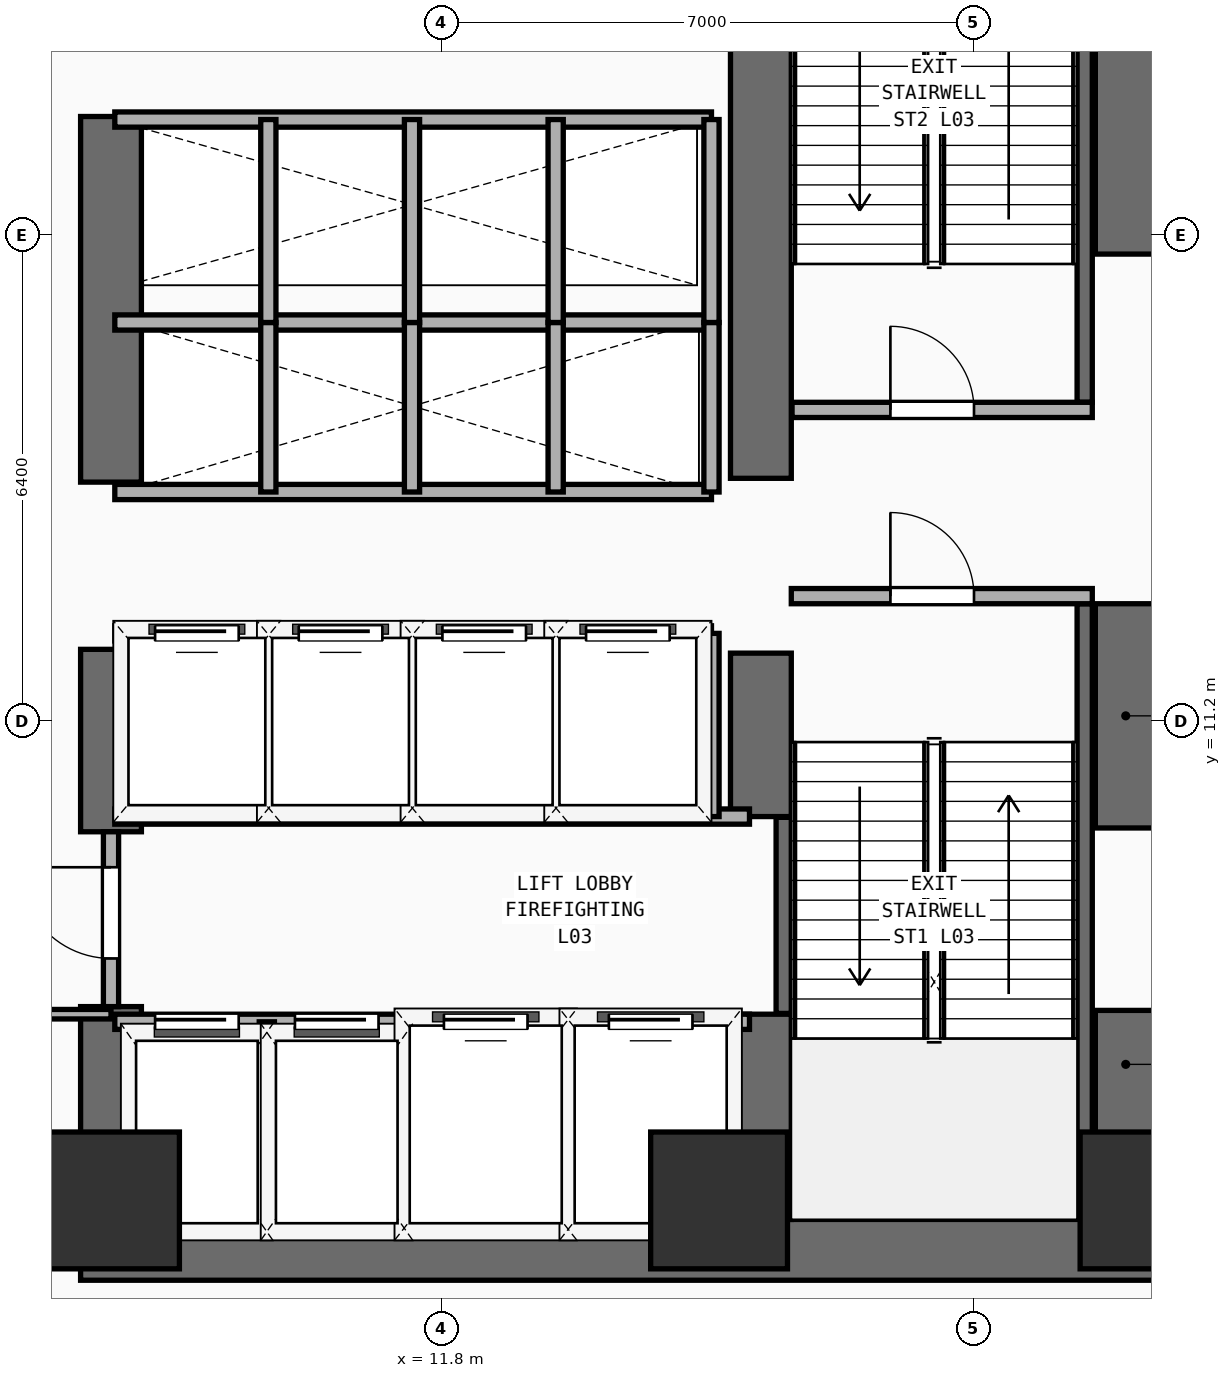
"""IFC4 building model, lengths in metres.
Left out: names, types, materials, properties, quantities, classifications, styles, units other than length and angle.
Written with IfcOpenShell. Run it as: python <this file> out.ifc"""

import sys

from ifc_helpers import new_model, si_unit, direction, frame, frame_2d, origin, origin_2d, place, context, subcontext, project, spatial, rectangle, extrude, element, fill, save


model = new_model("IFC4")
c1 = context("Model", 3, precision=1e-05, world=origin(), true_north=direction((0.0, 1.0)))
c2 = subcontext(c1, "Body", "Model", "MODEL_VIEW")
j1 = project(units=[si_unit("LENGTHUNIT", "METRE"), si_unit("PLANEANGLEUNIT", "RADIAN")], contexts=[c1])
p1 = place(None, origin())
s1 = spatial("IfcSite", under=j1, at=p1, CompositionType="ELEMENT")
p2 = place(p1, origin())
s2 = spatial("IfcBuilding", under=s1, at=p2, CompositionType="ELEMENT")
p3 = place(p2, frame((0.0, 0.0, 10.4)))
s3 = spatial("IfcBuildingStorey", under=s2, at=p3, CompositionType="ELEMENT", Elevation=10.4)
p4 = place(p3, frame((7.05, 4.25, 0.0), z_axis=(0.0, 0.0, 1.0), x_axis=(1.0, 0.0, 0.0)))
e1 = element("IfcWall", 1, at=p4, inside=s3, PredefinedType="SHEAR", context=c2, shape_type="SweptSolid", body=[
    extrude(rectangle(XDim=14.15, YDim=0.8, at=frame_2d((7.075, 0.0))), origin(), (0.0, 0.0, 1.0), 4.46),
])
p5 = place(p3, frame((7.45, 4.65, 0.0), z_axis=(0.0, 0.0, 1.0), x_axis=(0.0, 1.0, 0.0)))
e2 = element("IfcWall", 2, at=p5, inside=s3, PredefinedType="SHEAR", context=c2, shape_type="SweptSolid", body=[
    extrude(rectangle(XDim=2.8, YDim=0.8, at=frame_2d((1.4, 0.0))), origin(), (0.0, 0.0, 1.0), 4.46),
])
p6 = place(p3, frame((7.45, 9.75, 0.0), z_axis=(0.0, 0.0, 1.0), x_axis=(0.0, 1.0, 0.0)))
e3 = element("IfcWall", 3, at=p6, inside=s3, PredefinedType="SHEAR", context=c2, shape_type="SweptSolid", body=[
    extrude(rectangle(XDim=2.4, YDim=0.8, at=frame_2d((1.2, 0.0))), origin(), (0.0, 0.0, 1.0), 4.46),
])
p7 = place(p3, frame((7.45, 14.35, 0.0), z_axis=(0.0, 0.0, 1.0), x_axis=(0.0, 1.0, 0.0)))
e4 = element("IfcWall", 4, at=p7, inside=s3, PredefinedType="SHEAR", context=c2, shape_type="SweptSolid", body=[
    extrude(rectangle(XDim=4.81, YDim=0.8, at=frame_2d((2.405, 0.0))), origin(), (0.0, 0.0, 1.0), 4.46),
])
p8 = place(p3, frame((20.8, 4.65, 0.0), z_axis=(0.0, 0.0, 1.0), x_axis=(0.0, 1.0, 0.0)))
e5 = element("IfcWall", 5, at=p8, inside=s3, PredefinedType="SHEAR", context=c2, shape_type="SweptSolid", body=[
    extrude(rectangle(XDim=2.75, YDim=0.8, at=frame_2d((1.375, 0.0))), origin(), (0.0, 0.0, 1.0), 4.46),
])
p9 = place(p3, frame((20.8, 9.8, 0.0), z_axis=(0.0, 0.0, 1.0), x_axis=(0.0, 1.0, 0.0)))
e6 = element("IfcWall", 6, at=p9, inside=s3, PredefinedType="SHEAR", context=c2, shape_type="SweptSolid", body=[
    extrude(rectangle(XDim=2.95, YDim=0.8, at=frame_2d((1.475, 0.0))), origin(), (0.0, 0.0, 1.0), 4.46),
])
p10 = place(p3, frame((20.8, 17.35, 0.0), z_axis=(0.0, 0.0, 1.0), x_axis=(0.0, 1.0, 0.0)))
e7 = element("IfcWall", 7, at=p10, inside=s3, PredefinedType="SHEAR", context=c2, shape_type="SweptSolid", body=[
    extrude(rectangle(XDim=6.15, YDim=0.8, at=frame_2d((3.075, 0.0))), origin(), (0.0, 0.0, 1.0), 4.46),
])
p11 = place(p3, frame((16.0, 4.65, 0.0), z_axis=(0.0, 0.0, 1.0), x_axis=(0.0, 1.0, 0.0)))
e8 = element("IfcWall", 8, at=p11, inside=s3, PredefinedType="SHEAR", context=c2, shape_type="SweptSolid", body=[
    extrude(rectangle(XDim=2.7, YDim=0.8, at=frame_2d((1.35, 0.0))), origin(), (0.0, 0.0, 1.0), 4.46),
])
p12 = place(p3, frame((16.0, 9.95, 0.0), z_axis=(0.0, 0.0, 1.0), x_axis=(0.0, 1.0, 0.0)))
e9 = element("IfcWall", 9, at=p12, inside=s3, PredefinedType="SHEAR", context=c2, shape_type="SweptSolid", body=[
    extrude(rectangle(XDim=2.15, YDim=0.8, at=frame_2d((1.075, 0.0))), origin(), (0.0, 0.0, 1.0), 4.46),
])
p13 = place(p3, frame((16.0, 14.4, 0.0), z_axis=(0.0, 0.0, 1.0), x_axis=(0.0, 1.0, 0.0)))
e10 = element("IfcWall", 10, at=p13, inside=s3, PredefinedType="SHEAR", context=c2, shape_type="SweptSolid", body=[
    extrude(rectangle(XDim=9.1, YDim=0.8, at=frame_2d((4.55, 0.0))), origin(), (0.0, 0.0, 1.0), 4.46),
])
for number, where, z_axis, x_axis in (
    (11, (7.45, 4.9, 0.0), (0.0, 0.0, 1.0), (1.0, 0.0, 0.0)),
    (12, (15.45, 4.9, 0.0), (0.0, 0.0, 1.0), (1.0, 0.0, 0.0)),
    (13, (21.1, 4.9, 0.0), (0.0, 0.0, 1.0), (1.0, 0.0, 0.0)),
):
    element("IfcColumn", number, at=place(p3, frame(where, z_axis=z_axis, x_axis=x_axis)), inside=s3, PredefinedType="COLUMN", context=c2, shape_type="SweptSolid", body=[
        extrude(rectangle(XDim=1.8, YDim=1.8, at=origin_2d()), origin(), (0.0, 0.0, 1.0), 4.46),
    ])
p14 = place(p3, frame((16.3, 7.36, 0.0), z_axis=(0.0, 0.0, 1.0), x_axis=(0.0, 1.0, 0.0)))
e14 = element("IfcWall", 14, at=p14, inside=s3, PredefinedType="SHEAR", context=c2, shape_type="SweptSolid", body=[
    extrude(rectangle(XDim=2.58, YDim=0.2, at=frame_2d((1.29, 0.0))), origin(), (0.0, 0.0, 1.0), 4.46),
])
p15 = place(p3, frame((20.26, 4.66, 0.0), z_axis=(0.0, 0.0, 1.0), x_axis=(0.0, 1.0, 0.0)))
e15 = element("IfcWall", 15, at=p15, inside=s3, PredefinedType="SHEAR", context=c2, shape_type="SweptSolid", body=[
    extrude(rectangle(XDim=8.09, YDim=0.2, at=frame_2d((4.045, 0.0))), origin(), (0.0, 0.0, 1.0), 4.46),
])
p16 = place(p3, frame((16.4, 12.85, 0.0), z_axis=(0.0, 0.0, 1.0), x_axis=(1.0, 0.0, 0.0)))
e16 = element("IfcWall", 16, at=p16, inside=s3, PredefinedType="PARTITIONING", context=c2, shape_type="SweptSolid", body=[
    extrude(rectangle(XDim=3.96, YDim=0.2, at=frame_2d((1.98, 0.0))), origin(), (0.0, 0.0, 1.0), 4.46),
])
p17 = place(p16, frame((1.304, 0.0, 0.0)))
e17 = element("IfcOpeningElement", 17, at=p17, cuts=e16, PredefinedType="OPENING", context=c2, shape_type="SweptSolid", body=[
    extrude(rectangle(XDim=1.1, YDim=2.2, at=frame_2d((0.55, 1.1))), frame((0.0, 0.11, 0.0), z_axis=(0.0, -1.0, 0.0), x_axis=(1.0, 0.0, 0.0)), (0.0, 0.0, 1.0), 0.22),
])
p18 = place(p3, frame((20.26, 15.4, 0.0), z_axis=(0.0, 0.0, 1.0), x_axis=(0.0, 1.0, 0.0)))
e18 = element("IfcWall", 18, at=p18, inside=s3, PredefinedType="SHEAR", context=c2, shape_type="SweptSolid", body=[
    extrude(rectangle(XDim=8.09, YDim=0.2, at=frame_2d((4.045, 0.0))), origin(), (0.0, 0.0, 1.0), 4.46),
])
p19 = place(p3, frame((16.41, 15.3, 0.0), z_axis=(0.0, 0.0, 1.0), x_axis=(1.0, 0.0, 0.0)))
e19 = element("IfcWall", 19, at=p19, inside=s3, PredefinedType="PARTITIONING", context=c2, shape_type="SweptSolid", body=[
    extrude(rectangle(XDim=3.95, YDim=0.2, at=frame_2d((1.975, 0.0))), origin(), (0.0, 0.0, 1.0), 4.46),
])
p20 = place(p19, frame((1.294, 0.0, 0.0)))
e20 = element("IfcOpeningElement", 20, at=p20, cuts=e19, PredefinedType="OPENING", context=c2, shape_type="SweptSolid", body=[
    extrude(rectangle(XDim=1.1, YDim=2.2, at=frame_2d((0.55, 1.1))), frame((0.0, 0.11, 0.0), z_axis=(0.0, -1.0, 0.0), x_axis=(1.0, 0.0, 0.0)), (0.0, 0.0, 1.0), 0.22),
])
p21 = place(p3, frame((7.5, 7.25, 0.0), z_axis=(0.0, 0.0, 1.0), x_axis=(1.0, 0.0, 0.0)))
e21 = element("IfcWall", 21, at=p21, inside=s3, PredefinedType="PARTITIONING", context=c2, shape_type="SweptSolid", body=[
    extrude(rectangle(XDim=8.35, YDim=0.2, at=frame_2d((4.175, 0.0))), origin(), (0.0, 0.0, 1.0), 4.46),
])
p22 = place(p21, frame((0.53, 0.0, 0.0)))
e22 = element("IfcOpeningElement", 22, at=p22, cuts=e21, PredefinedType="OPENING", context=c2, shape_type="SweptSolid", body=[
    extrude(rectangle(XDim=1.1, YDim=2.2, at=frame_2d((0.55, 1.1))), frame((0.0, 0.11, 0.0), z_axis=(0.0, -1.0, 0.0), x_axis=(1.0, 0.0, 0.0)), (0.0, 0.0, 1.0), 0.22),
])
p23 = place(p21, frame((2.37, 0.0, 0.0)))
e23 = element("IfcOpeningElement", 23, at=p23, cuts=e21, PredefinedType="OPENING", context=c2, shape_type="SweptSolid", body=[
    extrude(rectangle(XDim=1.1, YDim=2.2, at=frame_2d((0.55, 1.1))), frame((0.0, 0.11, 0.0), z_axis=(0.0, -1.0, 0.0), x_axis=(1.0, 0.0, 0.0)), (0.0, 0.0, 1.0), 0.22),
])
p24 = place(p21, frame((4.33, 0.0, 0.0)))
e24 = element("IfcOpeningElement", 24, at=p24, cuts=e21, PredefinedType="OPENING", context=c2, shape_type="SweptSolid", body=[
    extrude(rectangle(XDim=1.1, YDim=2.2, at=frame_2d((0.55, 1.1))), frame((0.0, 0.11, 0.0), z_axis=(0.0, -1.0, 0.0), x_axis=(1.0, 0.0, 0.0)), (0.0, 0.0, 1.0), 0.22),
])
p25 = place(p21, frame((6.5, 0.0, 0.0)))
e25 = element("IfcOpeningElement", 25, at=p25, cuts=e21, PredefinedType="OPENING", context=c2, shape_type="SweptSolid", body=[
    extrude(rectangle(XDim=1.1, YDim=2.2, at=frame_2d((0.55, 1.1))), frame((0.0, 0.11, 0.0), z_axis=(0.0, -1.0, 0.0), x_axis=(1.0, 0.0, 0.0)), (0.0, 0.0, 1.0), 0.22),
])
p26 = place(p3, frame((7.5, 9.95, 0.0), z_axis=(0.0, 0.0, 1.0), x_axis=(1.0, 0.0, 0.0)))
e26 = element("IfcWall", 26, at=p26, inside=s3, PredefinedType="PARTITIONING", context=c2, shape_type="SweptSolid", body=[
    extrude(rectangle(XDim=8.35, YDim=0.2, at=frame_2d((4.175, 0.0))), origin(), (0.0, 0.0, 1.0), 4.46),
])
for number, where, z_axis, x_axis in (
    (27, (9.5, 4.45, 0.0), (0.0, 0.0, 1.0), (0.0, 1.0, 0.0)),
    (28, (11.36, 4.45, 0.0), (0.0, 0.0, 1.0), (0.0, 1.0, 0.0)),
    (29, (13.46, 4.45, 0.0), (0.0, 0.0, 1.0), (0.0, 1.0, 0.0)),
):
    element("IfcWall", number, at=place(p3, frame(where, z_axis=z_axis, x_axis=x_axis)), inside=s3, PredefinedType="PARTITIONING", context=c2, shape_type="SweptSolid", body=[
        extrude(rectangle(XDim=2.8, YDim=0.2, at=frame_2d((1.4, 0.0))), origin(), (0.0, 0.0, 1.0), 4.46),
    ])
p27 = place(p3, frame((7.45, 7.45, 0.0), z_axis=(0.0, 0.0, 1.0), x_axis=(0.0, 1.0, 0.0)))
e30 = element("IfcWall", 30, at=p27, inside=s3, PredefinedType="PARTITIONING", context=c2, shape_type="SweptSolid", body=[
    extrude(rectangle(XDim=2.3, YDim=0.2, at=frame_2d((1.15, 0.0))), origin(), (0.0, 0.0, 1.0), 3.24),
])
p28 = place(p27, frame((0.633, 0.0, 0.0)))
e31 = element("IfcOpeningElement", 31, at=p28, cuts=e30, PredefinedType="OPENING", context=c2, shape_type="SweptSolid", body=[
    extrude(rectangle(XDim=1.2, YDim=2.25, at=frame_2d((0.6, 1.125))), frame((0.0, 0.11, 0.0), z_axis=(0.0, -1.0, 0.0), x_axis=(1.0, 0.0, 0.0)), (0.0, 0.0, 1.0), 0.22),
])
p29 = place(p3, frame((7.5, 12.36, 0.0), z_axis=(0.0, 0.0, 1.0), x_axis=(1.0, 0.0, 0.0)))
e32 = element("IfcWall", 32, at=p29, inside=s3, PredefinedType="PARTITIONING", context=c2, shape_type="SweptSolid", body=[
    extrude(rectangle(XDim=7.85, YDim=0.2, at=frame_2d((3.925, 0.0))), origin(), (0.0, 0.0, 1.0), 4.46),
])
p30 = place(p29, frame((0.53, 0.0, 0.0)))
e33 = element("IfcOpeningElement", 33, at=p30, cuts=e32, PredefinedType="OPENING", context=c2, shape_type="SweptSolid", body=[
    extrude(rectangle(XDim=1.1, YDim=2.2, at=frame_2d((0.55, 1.1))), frame((0.0, 0.11, 0.0), z_axis=(0.0, -1.0, 0.0), x_axis=(1.0, 0.0, 0.0)), (0.0, 0.0, 1.0), 0.22),
])
p31 = place(p29, frame((2.42, 0.0, 0.0)))
e34 = element("IfcOpeningElement", 34, at=p31, cuts=e32, PredefinedType="OPENING", context=c2, shape_type="SweptSolid", body=[
    extrude(rectangle(XDim=1.1, YDim=2.2, at=frame_2d((0.55, 1.1))), frame((0.0, 0.11, 0.0), z_axis=(0.0, -1.0, 0.0), x_axis=(1.0, 0.0, 0.0)), (0.0, 0.0, 1.0), 0.22),
])
p32 = place(p29, frame((4.31, 0.0, 0.0)))
e35 = element("IfcOpeningElement", 35, at=p32, cuts=e32, PredefinedType="OPENING", context=c2, shape_type="SweptSolid", body=[
    extrude(rectangle(XDim=1.1, YDim=2.2, at=frame_2d((0.55, 1.1))), frame((0.0, 0.11, 0.0), z_axis=(0.0, -1.0, 0.0), x_axis=(1.0, 0.0, 0.0)), (0.0, 0.0, 1.0), 0.22),
])
p33 = place(p29, frame((6.2, 0.0, 0.0)))
e36 = element("IfcOpeningElement", 36, at=p33, cuts=e32, PredefinedType="OPENING", context=c2, shape_type="SweptSolid", body=[
    extrude(rectangle(XDim=1.1, YDim=2.2, at=frame_2d((0.55, 1.1))), frame((0.0, 0.11, 0.0), z_axis=(0.0, -1.0, 0.0), x_axis=(1.0, 0.0, 0.0)), (0.0, 0.0, 1.0), 0.22),
])
for number, where, z_axis, x_axis in (
    (37, (15.35, 9.95, 0.0), (0.0, 0.0, 1.0), (0.0, 1.0, 0.0)),
    (38, (9.52, 9.95, 0.0), (0.0, 0.0, 1.0), (0.0, 1.0, 0.0)),
    (39, (11.41, 9.95, 0.0), (0.0, 0.0, 1.0), (0.0, 1.0, 0.0)),
    (40, (13.3, 9.95, 0.0), (0.0, 0.0, 1.0), (0.0, 1.0, 0.0)),
):
    element("IfcWall", number, at=place(p3, frame(where, z_axis=z_axis, x_axis=x_axis)), inside=s3, PredefinedType="PARTITIONING", context=c2, shape_type="SweptSolid", body=[
        extrude(rectangle(XDim=2.41, YDim=0.2, at=frame_2d((1.205, 0.0))), origin(), (0.0, 0.0, 1.0), 4.46),
    ])
for number, where, z_axis, x_axis in (
    (41, (7.5, 14.22, 0.0), (0.0, 0.0, 1.0), (1.0, 0.0, 0.0)),
    (42, (7.5, 16.45, 0.0), (0.0, 0.0, 1.0), (1.0, 0.0, 0.0)),
):
    element("IfcWall", number, at=place(p3, frame(where, z_axis=z_axis, x_axis=x_axis)), inside=s3, PredefinedType="PARTITIONING", context=c2, shape_type="SweptSolid", body=[
        extrude(rectangle(XDim=7.85, YDim=0.2, at=frame_2d((3.925, 0.0))), origin(), (0.0, 0.0, 1.0), 4.46),
    ])
for number, where, z_axis, x_axis in (
    (43, (15.35, 14.22, 0.0), (0.0, 0.0, 1.0), (0.0, 1.0, 0.0)),
    (44, (9.52, 14.22, 0.0), (0.0, 0.0, 1.0), (0.0, 1.0, 0.0)),
    (45, (11.41, 14.22, 0.0), (0.0, 0.0, 1.0), (0.0, 1.0, 0.0)),
    (46, (13.3, 14.22, 0.0), (0.0, 0.0, 1.0), (0.0, 1.0, 0.0)),
):
    element("IfcWall", number, at=place(p3, frame(where, z_axis=z_axis, x_axis=x_axis)), inside=s3, PredefinedType="PARTITIONING", context=c2, shape_type="SweptSolid", body=[
        extrude(rectangle(XDim=2.23, YDim=0.2, at=frame_2d((1.115, 0.0))), origin(), (0.0, 0.0, 1.0), 4.46),
    ])
p34 = place(p3, frame((7.5, 19.12, 0.0), z_axis=(0.0, 0.0, 1.0), x_axis=(1.0, 0.0, 0.0)))
e47 = element("IfcWall", 47, at=p34, inside=s3, PredefinedType="PARTITIONING", context=c2, shape_type="SweptSolid", body=[
    extrude(rectangle(XDim=7.85, YDim=0.2, at=frame_2d((3.925, 0.0))), origin(), (0.0, 0.0, 1.0), 4.46),
])
for number, where, z_axis, x_axis in (
    (48, (15.35, 16.45, 0.0), (0.0, 0.0, 1.0), (0.0, 1.0, 0.0)),
    (49, (9.52, 16.45, 0.0), (0.0, 0.0, 1.0), (0.0, 1.0, 0.0)),
    (50, (11.41, 16.45, 0.0), (0.0, 0.0, 1.0), (0.0, 1.0, 0.0)),
    (51, (13.3, 16.45, 0.0), (0.0, 0.0, 1.0), (0.0, 1.0, 0.0)),
):
    element("IfcWall", number, at=place(p3, frame(where, z_axis=z_axis, x_axis=x_axis)), inside=s3, PredefinedType="PARTITIONING", context=c2, shape_type="SweptSolid", body=[
        extrude(rectangle(XDim=2.67, YDim=0.2, at=frame_2d((1.335, 0.0))), origin(), (0.0, 0.0, 1.0), 4.46),
    ])
p35 = place(p3, frame((0.42, 7.35, 0.0), z_axis=(0.0, 0.0, 1.0), x_axis=(1.0, 0.0, 0.0)))
e52 = element("IfcWall", 52, at=p35, inside=s3, PredefinedType="PARTITIONING", context=c2, shape_type="SweptSolid", body=[
    extrude(rectangle(XDim=7.03, YDim=0.125, at=frame_2d((3.515, 0.0))), origin(), (0.0, 0.0, 1.0), 4.46),
])
p36 = place(p35, frame((4.78, 0.0, 0.0)))
e53 = element("IfcOpeningElement", 53, at=p36, cuts=e52, PredefinedType="OPENING", context=c2, shape_type="SweptSolid", body=[
    extrude(rectangle(XDim=0.95, YDim=2.15, at=frame_2d((0.475, 1.075))), frame((0.0, 0.073, 0.0), z_axis=(0.0, -1.0, 0.0), x_axis=(1.0, 0.0, 0.0)), (0.0, 0.0, 1.0), 0.145),
])
p37 = place(p17, frame((1.1, 0.0, 0.0), z_axis=(0.0, 0.0, 1.0), x_axis=(-1.0, 0.0, 0.0)))
e54 = element("IfcDoor", 54, at=p37, inside=s3, OperationType="SINGLE_SWING_RIGHT", PredefinedType="DOOR", context=c2, shape_type="SweptSolid", body=[
    extrude(rectangle(XDim=1.1, YDim=2.2, at=frame_2d((0.55, 1.1))), frame((0.0, 0.025, 0.0), z_axis=(0.0, -1.0, 0.0), x_axis=(1.0, 0.0, 0.0)), (0.0, 0.0, 1.0), 0.05),
])
fill(e17, e54)
p38 = place(p20, origin())
e55 = element("IfcDoor", 55, at=p38, inside=s3, OperationType="SINGLE_SWING_LEFT", PredefinedType="DOOR", context=c2, shape_type="SweptSolid", body=[
    extrude(rectangle(XDim=1.1, YDim=2.2, at=frame_2d((0.55, 1.1))), frame((0.0, 0.025, 0.0), z_axis=(0.0, -1.0, 0.0), x_axis=(1.0, 0.0, 0.0)), (0.0, 0.0, 1.0), 0.05),
])
fill(e20, e55)
p39 = place(p22, origin())
e56 = element("IfcDoor", 56, at=p39, inside=s3, OperationType="SLIDING_TO_LEFT", PredefinedType="DOOR", context=c2, shape_type="SweptSolid", body=[
    extrude(rectangle(XDim=1.1, YDim=2.2, at=frame_2d((0.55, 1.1))), frame((0.0, 0.025, 0.0), z_axis=(0.0, -1.0, 0.0), x_axis=(1.0, 0.0, 0.0)), (0.0, 0.0, 1.0), 0.05),
])
fill(e22, e56)
p40 = place(p23, origin())
e57 = element("IfcDoor", 57, at=p40, inside=s3, OperationType="SLIDING_TO_LEFT", PredefinedType="DOOR", context=c2, shape_type="SweptSolid", body=[
    extrude(rectangle(XDim=1.1, YDim=2.2, at=frame_2d((0.55, 1.1))), frame((0.0, 0.025, 0.0), z_axis=(0.0, -1.0, 0.0), x_axis=(1.0, 0.0, 0.0)), (0.0, 0.0, 1.0), 0.05),
])
fill(e23, e57)
p41 = place(p24, origin())
e58 = element("IfcDoor", 58, at=p41, inside=s3, OperationType="SLIDING_TO_LEFT", PredefinedType="DOOR", context=c2, shape_type="SweptSolid", body=[
    extrude(rectangle(XDim=1.1, YDim=2.2, at=frame_2d((0.55, 1.1))), frame((0.0, 0.025, 0.0), z_axis=(0.0, -1.0, 0.0), x_axis=(1.0, 0.0, 0.0)), (0.0, 0.0, 1.0), 0.05),
])
fill(e24, e58)
p42 = place(p25, origin())
e59 = element("IfcDoor", 59, at=p42, inside=s3, OperationType="SLIDING_TO_LEFT", PredefinedType="DOOR", context=c2, shape_type="SweptSolid", body=[
    extrude(rectangle(XDim=1.1, YDim=2.2, at=frame_2d((0.55, 1.1))), frame((0.0, 0.025, 0.0), z_axis=(0.0, -1.0, 0.0), x_axis=(1.0, 0.0, 0.0)), (0.0, 0.0, 1.0), 0.05),
])
fill(e25, e59)
p43 = place(p28, frame((1.2, 0.0, 0.0), z_axis=(0.0, 0.0, 1.0), x_axis=(-1.0, 0.0, 0.0)))
e60 = element("IfcDoor", 60, at=p43, inside=s3, OperationType="SINGLE_SWING_LEFT", PredefinedType="DOOR", context=c2, shape_type="SweptSolid", body=[
    extrude(rectangle(XDim=1.2, YDim=2.25, at=frame_2d((0.6, 1.125))), frame((0.0, 0.025, 0.0), z_axis=(0.0, -1.0, 0.0), x_axis=(1.0, 0.0, 0.0)), (0.0, 0.0, 1.0), 0.05),
])
fill(e31, e60)
p44 = place(p30, origin())
e61 = element("IfcDoor", 61, at=p44, inside=s3, OperationType="SLIDING_TO_LEFT", PredefinedType="DOOR", context=c2, shape_type="SweptSolid", body=[
    extrude(rectangle(XDim=1.1, YDim=2.2, at=frame_2d((0.55, 1.1))), frame((0.0, 0.025, 0.0), z_axis=(0.0, -1.0, 0.0), x_axis=(1.0, 0.0, 0.0)), (0.0, 0.0, 1.0), 0.05),
])
fill(e33, e61)
p45 = place(p31, origin())
e62 = element("IfcDoor", 62, at=p45, inside=s3, OperationType="SLIDING_TO_LEFT", PredefinedType="DOOR", context=c2, shape_type="SweptSolid", body=[
    extrude(rectangle(XDim=1.1, YDim=2.2, at=frame_2d((0.55, 1.1))), frame((0.0, 0.025, 0.0), z_axis=(0.0, -1.0, 0.0), x_axis=(1.0, 0.0, 0.0)), (0.0, 0.0, 1.0), 0.05),
])
fill(e34, e62)
p46 = place(p32, origin())
e63 = element("IfcDoor", 63, at=p46, inside=s3, OperationType="SLIDING_TO_LEFT", PredefinedType="DOOR", context=c2, shape_type="SweptSolid", body=[
    extrude(rectangle(XDim=1.1, YDim=2.2, at=frame_2d((0.55, 1.1))), frame((0.0, 0.025, 0.0), z_axis=(0.0, -1.0, 0.0), x_axis=(1.0, 0.0, 0.0)), (0.0, 0.0, 1.0), 0.05),
])
fill(e35, e63)
p47 = place(p33, origin())
e64 = element("IfcDoor", 64, at=p47, inside=s3, OperationType="SLIDING_TO_LEFT", PredefinedType="DOOR", context=c2, shape_type="SweptSolid", body=[
    extrude(rectangle(XDim=1.1, YDim=2.2, at=frame_2d((0.55, 1.1))), frame((0.0, 0.025, 0.0), z_axis=(0.0, -1.0, 0.0), x_axis=(1.0, 0.0, 0.0)), (0.0, 0.0, 1.0), 0.05),
])
fill(e36, e64)
save(model, sys.argv[1])
